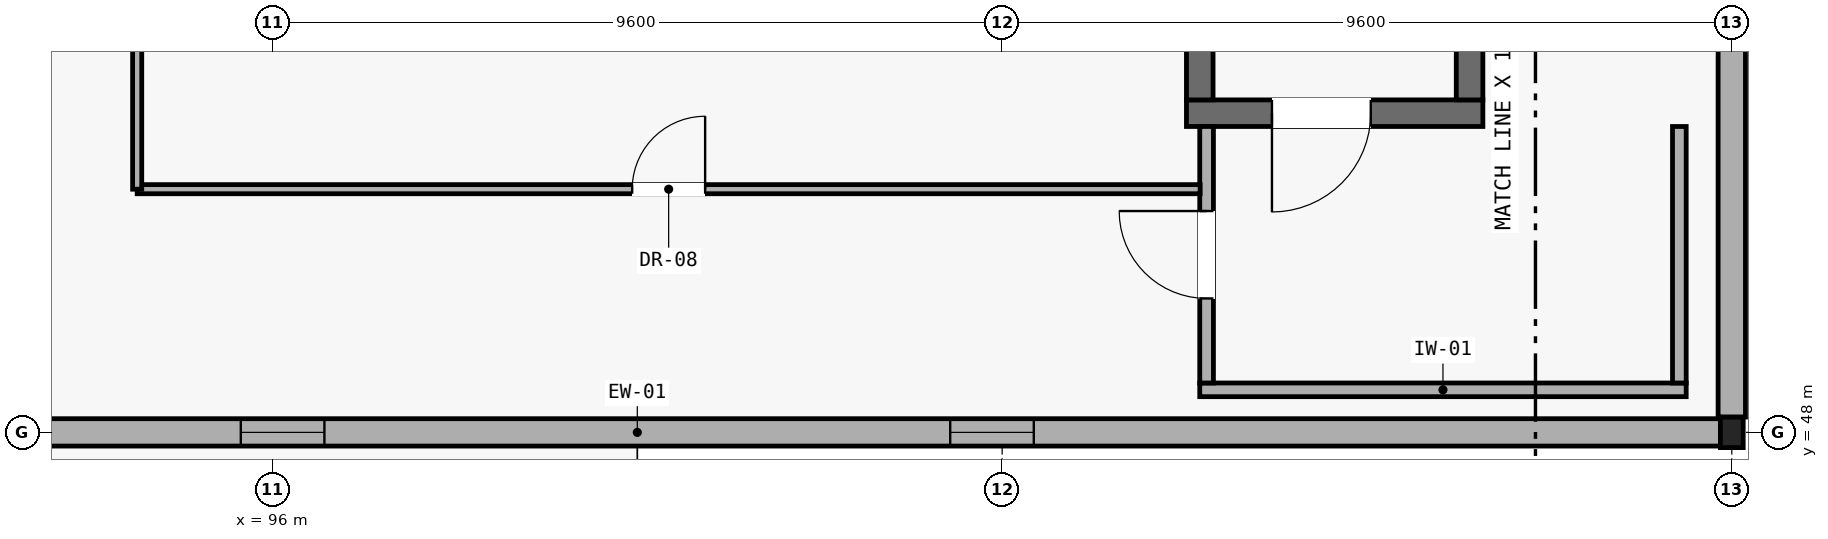
"""IFC4 building model, lengths in metres.
Left out: names, types, materials, properties, quantities, classifications, styles, units other than length and angle.
Written with IfcOpenShell. Run it as: python <this file> out.ifc"""

import sys

from ifc_helpers import new_model, si_unit, direction, frame, frame_2d, origin, origin_2d, place, context, subcontext, project, spatial, rectangle, i_section, extrude, element, fill, save


model = new_model("IFC4")
c1 = context("Model", 3, precision=1e-05, world=origin(), true_north=direction((0.0, 1.0)))
c2 = subcontext(c1, "Body", "Model", "MODEL_VIEW")
j1 = project(units=[si_unit("LENGTHUNIT", "METRE"), si_unit("PLANEANGLEUNIT", "RADIAN")], contexts=[c1])
p1 = place(None, origin())
s1 = spatial("IfcSite", under=j1, at=p1, CompositionType="ELEMENT")
p2 = place(p1, origin())
s2 = spatial("IfcBuilding", under=s1, at=p2, CompositionType="ELEMENT")
p3 = place(p2, frame((0.0, 0.0, 9.45)))
s3 = spatial("IfcBuildingStorey", under=s2, at=p3, CompositionType="ELEMENT", Elevation=9.45)
p4 = place(p3, frame((115.2, 48.0, 0.0), z_axis=(0.0, 0.0, 1.0), x_axis=(1.0, 0.0, 0.0)))
e1 = element("IfcColumn", 1, at=p4, inside=s3, PredefinedType="COLUMN", context=c2, shape_type="SweptSolid", body=[
    extrude(i_section(OverallWidth=0.3, OverallDepth=0.4, WebThickness=0.013, FlangeThickness=0.024, FilletRadius=0.027, at=origin_2d()), origin(), (0.0, 0.0, 1.0), 4.2),
])
p5 = place(p3, frame((115.2, 48.202, 0.0), z_axis=(0.0, 0.0, 1.0), x_axis=(0.0, 1.0, 0.0)))
e2 = element("IfcWall", 2, at=p5, inside=s3, PredefinedType="SOLIDWALL", context=c2, shape_type="SweptSolid", body=[
    extrude(rectangle(XDim=9.196, YDim=0.36, at=frame_2d((4.598, 0.0))), origin(), (0.0, 0.0, 1.0), 3.51),
])
p6 = place(p3, frame((86.409, 48.0, 0.0), z_axis=(0.0, 0.0, 1.0), x_axis=(1.0, 0.0, 0.0)))
e3 = element("IfcWall", 3, at=p6, inside=s3, PredefinedType="SOLIDWALL", context=c2, shape_type="SweptSolid", body=[
    extrude(rectangle(XDim=28.782, YDim=0.36, at=frame_2d((14.391, 0.0))), origin(), (0.0, 0.0, 1.0), 3.145),
])
p7 = place(p6, frame((9.175, 0.0, 0.9)))
e4 = element("IfcOpeningElement", 4, at=p7, cuts=e3, PredefinedType="OPENING", context=c2, shape_type="SweptSolid", body=[
    extrude(rectangle(XDim=1.1, YDim=0.7, at=frame_2d((0.55, 0.35))), frame((0.0, 0.19, 0.0), z_axis=(0.0, -1.0, 0.0), x_axis=(1.0, 0.0, 0.0)), (0.0, 0.0, 1.0), 0.38),
])
p8 = place(p6, frame((18.508, 0.0, 0.9)))
e5 = element("IfcOpeningElement", 5, at=p8, cuts=e3, PredefinedType="OPENING", context=c2, shape_type="SweptSolid", body=[
    extrude(rectangle(XDim=1.1, YDim=0.7, at=frame_2d((0.55, 0.35))), frame((0.0, 0.19, 0.0), z_axis=(0.0, -1.0, 0.0), x_axis=(1.0, 0.0, 0.0)), (0.0, 0.0, 1.0), 0.38),
])
p9 = place(p3, frame((108.025, 52.2, 0.0), z_axis=(0.0, 0.0, 1.0), x_axis=(1.0, 0.0, 0.0)))
e6 = element("IfcWall", 6, at=p9, inside=s3, PredefinedType="SHEAR", context=c2, shape_type="SweptSolid", body=[
    extrude(rectangle(XDim=3.9, YDim=0.35, at=frame_2d((1.95, 0.0))), origin(), (0.0, 0.0, 1.0), 3.97),
])
p10 = place(p9, frame((1.125, 0.0, 0.0)))
e7 = element("IfcOpeningElement", 7, at=p10, cuts=e6, PredefinedType="OPENING", context=c2, shape_type="SweptSolid", body=[
    extrude(rectangle(XDim=1.3, YDim=2.15, at=frame_2d((0.65, 1.075))), frame((0.0, 0.185, 0.0), z_axis=(0.0, -1.0, 0.0), x_axis=(1.0, 0.0, 0.0)), (0.0, 0.0, 1.0), 0.37),
])
for number, where, z_axis, x_axis in (
    (8, (108.2, 52.375, 0.0), (0.0, 0.0, 1.0), (0.0, 1.0, 0.0)),
    (9, (111.75, 52.375, 0.0), (0.0, 0.0, 1.0), (0.0, 1.0, 0.0)),
):
    element("IfcWall", number, at=place(p3, frame(where, z_axis=z_axis, x_axis=x_axis)), inside=s3, PredefinedType="SHEAR", context=c2, shape_type="SweptSolid", body=[
        extrude(rectangle(XDim=7.6, YDim=0.35, at=frame_2d((3.8, 0.0))), origin(), (0.0, 0.0, 1.0), 3.97),
    ])
p11 = place(p3, frame((108.2, 48.56, 0.0), z_axis=(0.0, 0.0, 1.0), x_axis=(1.0, 0.0, 0.0)))
e10 = element("IfcWall", 10, at=p11, inside=s3, PredefinedType="PARTITIONING", context=c2, shape_type="SweptSolid", body=[
    extrude(rectangle(XDim=6.4, YDim=0.18, at=frame_2d((3.2, 0.0))), origin(), (0.0, 0.0, 1.0), 3.97),
])
p12 = place(p3, frame((108.29, 48.65, 0.0), z_axis=(0.0, 0.0, 1.0), x_axis=(0.0, 1.0, 0.0)))
e11 = element("IfcWall", 11, at=p12, inside=s3, PredefinedType="PARTITIONING", context=c2, shape_type="SweptSolid", body=[
    extrude(rectangle(XDim=3.375, YDim=0.18, at=frame_2d((1.688, 0.0))), origin(), (0.0, 0.0, 1.0), 3.97),
])
p13 = place(p12, frame((1.113, 0.0, 0.0)))
e12 = element("IfcOpeningElement", 12, at=p13, cuts=e11, PredefinedType="OPENING", context=c2, shape_type="SweptSolid", body=[
    extrude(rectangle(XDim=1.15, YDim=2.15, at=frame_2d((0.575, 1.075))), frame((0.0, 0.1, 0.0), z_axis=(0.0, -1.0, 0.0), x_axis=(1.0, 0.0, 0.0)), (0.0, 0.0, 1.0), 0.2),
])
p14 = place(p3, frame((114.51, 48.65, 0.0), z_axis=(0.0, 0.0, 1.0), x_axis=(0.0, 1.0, 0.0)))
e13 = element("IfcWall", 13, at=p14, inside=s3, PredefinedType="PARTITIONING", context=c2, shape_type="SweptSolid", body=[
    extrude(rectangle(XDim=3.375, YDim=0.18, at=frame_2d((1.688, 0.0))), origin(), (0.0, 0.0, 1.0), 3.97),
])
p15 = place(p3, frame((94.22, 51.2, 0.0), z_axis=(0.0, 0.0, 1.0), x_axis=(1.0, 0.0, 0.0)))
e14 = element("IfcWall", 14, at=p15, inside=s3, PredefinedType="PARTITIONING", context=c2, shape_type="SweptSolid", body=[
    extrude(rectangle(XDim=13.985, YDim=0.12, at=frame_2d((6.993, 0.0))), origin(), (0.0, 0.0, 1.0), 3.5),
])
p16 = place(p15, frame((6.512, 0.0, 0.0)))
e15 = element("IfcOpeningElement", 15, at=p16, cuts=e14, PredefinedType="OPENING", context=c2, shape_type="SweptSolid", body=[
    extrude(rectangle(XDim=0.96, YDim=2.08, at=frame_2d((0.48, 1.04))), frame((0.0, 0.07, 0.0), z_axis=(0.0, -1.0, 0.0), x_axis=(1.0, 0.0, 0.0)), (0.0, 0.0, 1.0), 0.14),
])
p17 = place(p3, frame((94.22, 60.6, 0.0), z_axis=(0.0, 0.0, 1.0), x_axis=(0.0, -1.0, 0.0)))
e16 = element("IfcWall", 16, at=p17, inside=s3, PredefinedType="PARTITIONING", context=c2, shape_type="SweptSolid", body=[
    extrude(rectangle(XDim=9.4, YDim=0.12, at=frame_2d((4.7, 0.0))), origin(), (0.0, 0.0, 1.0), 3.97),
])
p18 = place(p7, origin())
e17 = element("IfcWindow", 17, at=p18, inside=s3, PartitioningType="SINGLE_PANEL", PredefinedType="WINDOW", context=c2, shape_type="SweptSolid", body=[
    extrude(rectangle(XDim=1.1, YDim=0.7, at=frame_2d((0.55, 0.35))), frame((0.0, 0.03, 0.0), z_axis=(0.0, -1.0, 0.0), x_axis=(1.0, 0.0, 0.0)), (0.0, 0.0, 1.0), 0.06),
])
fill(e4, e17)
p19 = place(p8, origin())
e18 = element("IfcWindow", 18, at=p19, inside=s3, PartitioningType="SINGLE_PANEL", PredefinedType="WINDOW", context=c2, shape_type="SweptSolid", body=[
    extrude(rectangle(XDim=1.1, YDim=0.7, at=frame_2d((0.55, 0.35))), frame((0.0, 0.03, 0.0), z_axis=(0.0, -1.0, 0.0), x_axis=(1.0, 0.0, 0.0)), (0.0, 0.0, 1.0), 0.06),
])
fill(e5, e18)
p20 = place(p10, frame((1.3, 0.0, 0.0), z_axis=(0.0, 0.0, 1.0), x_axis=(-1.0, 0.0, 0.0)))
e19 = element("IfcDoor", 19, at=p20, inside=s3, OperationType="SINGLE_SWING_LEFT", PredefinedType="DOOR", context=c2, shape_type="SweptSolid", body=[
    extrude(rectangle(XDim=1.3, YDim=2.15, at=frame_2d((0.65, 1.075))), frame((0.0, 0.025, 0.0), z_axis=(0.0, -1.0, 0.0), x_axis=(1.0, 0.0, 0.0)), (0.0, 0.0, 1.0), 0.05),
])
fill(e7, e19)
p21 = place(p13, origin())
e20 = element("IfcDoor", 20, at=p21, inside=s3, OperationType="SINGLE_SWING_RIGHT", PredefinedType="DOOR", context=c2, shape_type="SweptSolid", body=[
    extrude(rectangle(XDim=1.15, YDim=2.15, at=frame_2d((0.575, 1.075))), frame((0.0, 0.025, 0.0), z_axis=(0.0, -1.0, 0.0), x_axis=(1.0, 0.0, 0.0)), (0.0, 0.0, 1.0), 0.05),
])
fill(e12, e20)
p22 = place(p16, origin())
e21 = element("IfcDoor", 21, at=p22, inside=s3, OperationType="SINGLE_SWING_RIGHT", PredefinedType="DOOR", context=c2, shape_type="SweptSolid", body=[
    extrude(rectangle(XDim=0.96, YDim=2.08, at=frame_2d((0.48, 1.04))), frame((0.0, 0.025, 0.0), z_axis=(0.0, -1.0, 0.0), x_axis=(1.0, 0.0, 0.0)), (0.0, 0.0, 1.0), 0.05),
])
fill(e15, e21)
save(model, sys.argv[1])
